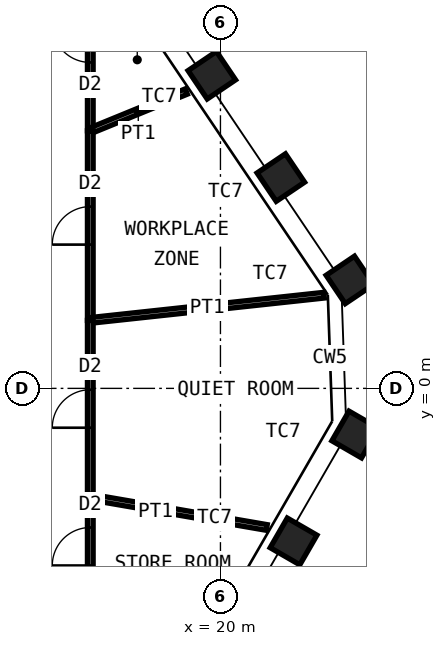
"""IFC4 building model, lengths in metres.
Left out: names, types, materials, properties, quantities, classifications, styles, units other than length and angle.
Written with IfcOpenShell. Run it as: python <this file> out.ifc"""

import sys

from ifc_helpers import new_model, si_unit, direction, frame, frame_2d, origin, origin_2d, place, context, subcontext, project, spatial, rectangle, hollow_rectangle, extrude, element, fill, save


model = new_model("IFC4")
c1 = context("Model", 3, precision=1e-05, world=origin(), true_north=direction((0.0, 1.0)))
c2 = subcontext(c1, "Body", "Model", "MODEL_VIEW")
j1 = project(units=[si_unit("LENGTHUNIT", "METRE"), si_unit("PLANEANGLEUNIT", "RADIAN")], contexts=[c1])
p1 = place(None, origin())
s1 = spatial("IfcSite", under=j1, at=p1, CompositionType="ELEMENT")
p2 = place(p1, origin())
s2 = spatial("IfcBuilding", under=s1, at=p2, CompositionType="ELEMENT")
p3 = place(p2, frame((0.0, 0.0, 278.8)))
s3 = spatial("IfcBuildingStorey", under=s2, at=p3, CompositionType="ELEMENT", Elevation=278.8)
for number, where, z_axis, x_axis in (
    (1, (19.773, 8.239, 0.0), (0.0, 0.0, 1.0), (-0.559, 0.829, 0.0)),
    (2, (21.589, 5.547, 0.0), (0.0, 0.0, 1.0), (-0.559, 0.829, 0.0)),
    (3, (23.406, 2.854, 0.0), (0.0, 0.0, 1.0), (-0.559, 0.829, 0.0)),
    (4, (23.548, -1.214, 0.0), (0.0, 0.0, 1.0), (0.5, 0.866, 0.0)),
    (5, (21.924, -4.027, 0.0), (0.0, 0.0, 1.0), (0.5, 0.866, 0.0)),
):
    element("IfcColumn", number, at=place(p3, frame(where, z_axis=z_axis, x_axis=x_axis)), inside=s3, PredefinedType="COLUMN", context=c2, shape_type="SweptSolid", body=[
        extrude(hollow_rectangle(XDim=0.9, YDim=0.9, WallThickness=0.06, at=origin_2d()), origin(), (0.0, 0.0, 1.0), 4.2),
    ])
p4 = place(p3, frame((16.575, 11.375, 0.0), z_axis=(0.0, 0.0, 1.0), x_axis=(0.0, -1.0, 0.0)))
e6 = element("IfcWall", 6, at=p4, inside=s3, PredefinedType="PARTITIONING", context=c2, shape_type="SweptSolid", body=[
    extrude(rectangle(XDim=4.597, YDim=0.15, at=frame_2d((2.299, 0.0))), origin(), (0.0, 0.0, 1.0), 4.03),
])
p5 = place(p4, frame((1.799, 0.0, 0.0)))
e7 = element("IfcOpeningElement", 7, at=p5, cuts=e6, PredefinedType="OPENING", context=c2, shape_type="SweptSolid", body=[
    extrude(rectangle(XDim=1.0, YDim=2.4, at=frame_2d((0.5, 1.2))), frame((0.0, 0.085, 0.0), z_axis=(0.0, -1.0, 0.0), x_axis=(1.0, 0.0, 0.0)), (0.0, 0.0, 1.0), 0.17),
])
p6 = place(p3, frame((19.1, 7.81, 0.0), z_axis=(0.0, 0.0, 1.0), x_axis=(-0.925616791812, -0.378462091518, 0.0)))
e8 = element("IfcWall", 8, at=p6, inside=s3, PredefinedType="PARTITIONING", context=c2, shape_type="SweptSolid", body=[
    extrude(rectangle(XDim=2.728, YDim=0.15, at=frame_2d((1.364, 0.0))), origin(), (0.0, 0.0, 1.0), 3.33),
])
p7 = place(p3, frame((16.575, 6.778, 0.0), z_axis=(0.0, 0.0, 1.0), x_axis=(0.0, -1.0, 0.0)))
e9 = element("IfcWall", 9, at=p7, inside=s3, PredefinedType="PARTITIONING", context=c2, shape_type="SweptSolid", body=[
    extrude(rectangle(XDim=4.99, YDim=0.15, at=frame_2d((2.495, 0.0))), origin(), (0.0, 0.0, 1.0), 4.03),
])
p8 = place(p7, frame((1.995, 0.0, 0.0)))
e10 = element("IfcOpeningElement", 10, at=p8, cuts=e9, PredefinedType="OPENING", context=c2, shape_type="SweptSolid", body=[
    extrude(rectangle(XDim=1.0, YDim=2.4, at=frame_2d((0.5, 1.2))), frame((0.0, 0.085, 0.0), z_axis=(0.0, -1.0, 0.0), x_axis=(1.0, 0.0, 0.0)), (0.0, 0.0, 1.0), 0.17),
])
p9 = place(p3, frame((22.726, 2.452, 0.0), z_axis=(0.0, 0.0, 1.0), x_axis=(-0.994230957157, -0.107260448581, 0.0)))
e11 = element("IfcWall", 11, at=p9, inside=s3, PredefinedType="PARTITIONING", context=c2, shape_type="SweptSolid", body=[
    extrude(rectangle(XDim=6.187, YDim=0.15, at=frame_2d((3.093, 0.0))), origin(), (0.0, 0.0, 1.0), 4.03),
])
p10 = place(p3, frame((16.575, 1.788, 0.0), z_axis=(0.0, 0.0, 1.0), x_axis=(0.0, -1.0, 0.0)))
e12 = element("IfcWall", 12, at=p10, inside=s3, PredefinedType="PARTITIONING", context=c2, shape_type="SweptSolid", body=[
    extrude(rectangle(XDim=4.647, YDim=0.15, at=frame_2d((2.324, 0.0))), origin(), (0.0, 0.0, 1.0), 4.03),
])
p11 = place(p10, frame((1.824, 0.0, 0.0)))
e13 = element("IfcOpeningElement", 13, at=p11, cuts=e12, PredefinedType="OPENING", context=c2, shape_type="SweptSolid", body=[
    extrude(rectangle(XDim=1.0, YDim=2.4, at=frame_2d((0.5, 1.2))), frame((0.0, 0.085, 0.0), z_axis=(0.0, -1.0, 0.0), x_axis=(1.0, 0.0, 0.0)), (0.0, 0.0, 1.0), 0.17),
])
p12 = place(p3, frame((21.219, -3.66, 0.0), z_axis=(0.0, 0.0, 1.0), x_axis=(-0.985448448161, 0.16997457462, 0.0)))
e14 = element("IfcWall", 14, at=p12, inside=s3, PredefinedType="PARTITIONING", context=c2, shape_type="SweptSolid", body=[
    extrude(rectangle(XDim=4.713, YDim=0.15, at=frame_2d((2.356, 0.0))), origin(), (0.0, 0.0, 1.0), 4.03),
])
p13 = place(p3, frame((16.575, -2.859, 0.0), z_axis=(0.0, 0.0, 1.0), x_axis=(0.0, -1.0, 0.0)))
e15 = element("IfcWall", 15, at=p13, inside=s3, PredefinedType="PARTITIONING", context=c2, shape_type="SweptSolid", body=[
    extrude(rectangle(XDim=2.603, YDim=0.15, at=frame_2d((1.302, 0.0))), origin(), (0.0, 0.0, 1.0), 4.03),
])
p14 = place(p13, frame((0.802, 0.0, 0.0)))
e16 = element("IfcOpeningElement", 16, at=p14, cuts=e15, PredefinedType="OPENING", context=c2, shape_type="SweptSolid", body=[
    extrude(rectangle(XDim=1.0, YDim=2.4, at=frame_2d((0.5, 1.2))), frame((0.0, 0.085, 0.0), z_axis=(0.0, -1.0, 0.0), x_axis=(1.0, 0.0, 0.0)), (0.0, 0.0, 1.0), 0.17),
])
p15 = place(p5, origin())
e17 = element("IfcDoor", 17, at=p15, inside=s3, OperationType="SINGLE_SWING_LEFT", PredefinedType="DOOR", context=c2, shape_type="SweptSolid", body=[
    extrude(rectangle(XDim=1.0, YDim=2.4, at=frame_2d((0.5, 1.2))), frame((0.0, 0.025, 0.0), z_axis=(0.0, -1.0, 0.0), x_axis=(1.0, 0.0, 0.0)), (0.0, 0.0, 1.0), 0.05),
])
fill(e7, e17)
p16 = place(p8, origin())
e18 = element("IfcDoor", 18, at=p16, inside=s3, OperationType="SINGLE_SWING_RIGHT", PredefinedType="DOOR", context=c2, shape_type="SweptSolid", body=[
    extrude(rectangle(XDim=1.0, YDim=2.4, at=frame_2d((0.5, 1.2))), frame((0.0, 0.025, 0.0), z_axis=(0.0, -1.0, 0.0), x_axis=(1.0, 0.0, 0.0)), (0.0, 0.0, 1.0), 0.05),
])
fill(e10, e18)
p17 = place(p11, origin())
e19 = element("IfcDoor", 19, at=p17, inside=s3, OperationType="SINGLE_SWING_RIGHT", PredefinedType="DOOR", context=c2, shape_type="SweptSolid", body=[
    extrude(rectangle(XDim=1.0, YDim=2.4, at=frame_2d((0.5, 1.2))), frame((0.0, 0.025, 0.0), z_axis=(0.0, -1.0, 0.0), x_axis=(1.0, 0.0, 0.0)), (0.0, 0.0, 1.0), 0.05),
])
fill(e13, e19)
p18 = place(p14, origin())
e20 = element("IfcDoor", 20, at=p18, inside=s3, OperationType="SINGLE_SWING_RIGHT", PredefinedType="DOOR", context=c2, shape_type="SweptSolid", body=[
    extrude(rectangle(XDim=1.0, YDim=2.4, at=frame_2d((0.5, 1.2))), frame((0.0, 0.025, 0.0), z_axis=(0.0, -1.0, 0.0), x_axis=(1.0, 0.0, 0.0)), (0.0, 0.0, 1.0), 0.05),
])
fill(e16, e20)
save(model, sys.argv[1])
